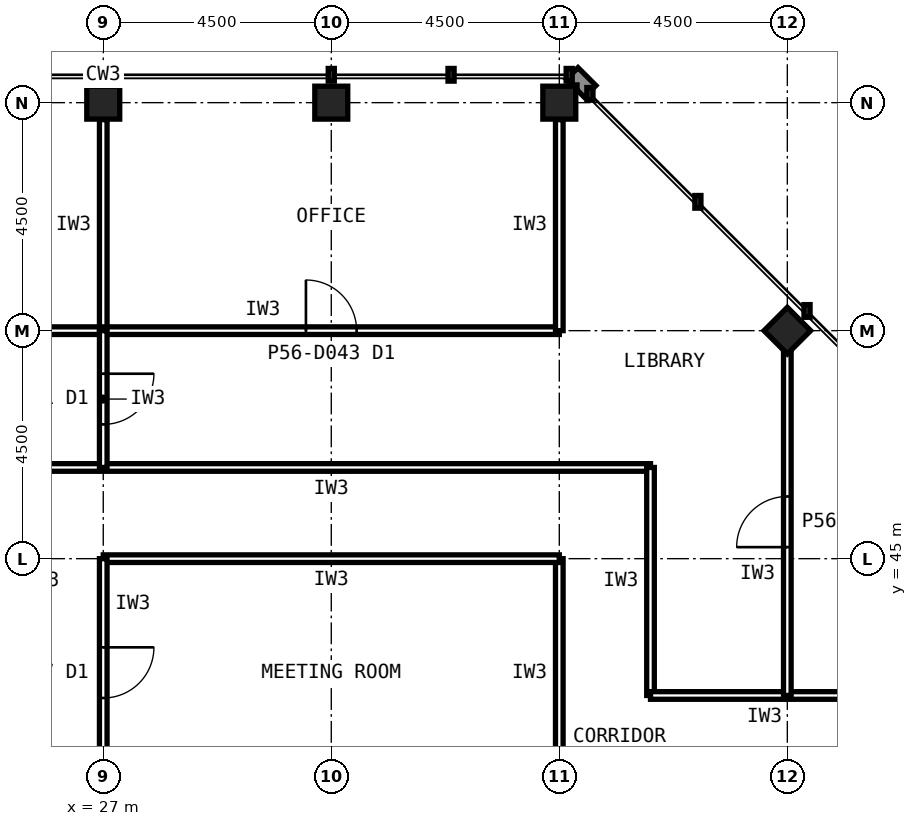
"""IFC4 building model, lengths in metres.
Left out: names, types, materials, properties, quantities, classifications, styles, units other than length and angle.
Written with IfcOpenShell. Run it as: python <this file> out.ifc"""

import sys

from ifc_helpers import new_model, si_unit, direction, frame, frame_2d, origin, origin_2d, place, context, subcontext, project, spatial, rectangle, hollow_rectangle, extrude, element, fill, save


model = new_model("IFC4")
c1 = context("Model", 3, precision=1e-05, world=origin(), true_north=direction((0.0, 1.0)))
c2 = subcontext(c1, "Body", "Model", "MODEL_VIEW")
j1 = project(units=[si_unit("LENGTHUNIT", "METRE"), si_unit("PLANEANGLEUNIT", "RADIAN")], contexts=[c1])
p1 = place(None, origin())
s1 = spatial("IfcSite", under=j1, at=p1, CompositionType="ELEMENT")
p2 = place(p1, origin())
s2 = spatial("IfcBuilding", under=s1, at=p2, CompositionType="ELEMENT")
p3 = place(p2, frame((0.0, 0.0, 238.6)))
s3 = spatial("IfcBuildingStorey", under=s2, at=p3, CompositionType="ELEMENT", Elevation=238.6)
for number, where, z_axis, x_axis in (
    (1, (36.0, 54.0, 0.0), (0.0, 0.0, 1.0), (1.0, 0.0, 0.0)),
    (2, (31.5, 54.0, 0.0), (0.0, 0.0, 1.0), (1.0, 0.0, 0.0)),
    (3, (27.0, 54.0, 0.0), (0.0, 0.0, 1.0), (1.0, 0.0, 0.0)),
    (4, (40.5, 49.5, 0.0), (0.0, 0.0, 1.0), (0.707, 0.707, 0.0)),
):
    element("IfcColumn", number, at=place(p3, frame(where, z_axis=z_axis, x_axis=x_axis)), inside=s3, PredefinedType="COLUMN", context=c2, shape_type="SweptSolid", body=[
        extrude(hollow_rectangle(XDim=0.65, YDim=0.65, WallThickness=0.032, at=origin_2d()), origin(), (0.0, 0.0, 1.0), 4.0),
    ])
p4 = place(p3, frame((37.8, 46.8, 0.0), z_axis=(0.0, 0.0, 1.0), x_axis=(-1.0, 0.0, 0.0)))
e5 = element("IfcWall", 5, at=p4, inside=s3, PredefinedType="PARTITIONING", context=c2, shape_type="SweptSolid", body=[
    extrude(rectangle(XDim=12.6, YDim=0.15, at=frame_2d((6.3, 0.0))), origin(), (0.0, 0.0, 1.0), 3.84),
])
for number, where, z_axis, x_axis in (
    (6, (37.8, 42.3, 0.0), (0.0, 0.0, 1.0), (0.0, 1.0, 0.0)),
    (7, (42.3, 42.3, 0.0), (0.0, 0.0, 1.0), (-1.0, 0.0, 0.0)),
):
    element("IfcWall", number, at=place(p3, frame(where, z_axis=z_axis, x_axis=x_axis)), inside=s3, PredefinedType="PARTITIONING", context=c2, shape_type="SweptSolid", body=[
        extrude(rectangle(XDim=4.5, YDim=0.15, at=frame_2d((2.25, 0.0))), origin(), (0.0, 0.0, 1.0), 3.84),
    ])
p5 = place(p3, frame((36.0, 40.5, 0.0), z_axis=(0.0, 0.0, 1.0), x_axis=(0.0, 1.0, 0.0)))
e8 = element("IfcWall", 8, at=p5, inside=s3, PredefinedType="PARTITIONING", context=c2, shape_type="SweptSolid", body=[
    extrude(rectangle(XDim=4.5, YDim=0.15, at=frame_2d((2.25, 0.0))), origin(), (0.0, 0.0, 1.0), 2.989),
])
p6 = place(p3, frame((36.0, 45.0, 0.0), z_axis=(0.0, 0.0, 1.0), x_axis=(-1.0, 0.0, 0.0)))
e9 = element("IfcWall", 9, at=p6, inside=s3, PredefinedType="PARTITIONING", context=c2, shape_type="SweptSolid", body=[
    extrude(rectangle(XDim=9.0, YDim=0.15, at=frame_2d((4.5, 0.0))), origin(), (0.0, 0.0, 1.0), 3.84),
])
p7 = place(p3, frame((27.0, 45.0, 0.0), z_axis=(0.0, 0.0, 1.0), x_axis=(0.0, -1.0, 0.0)))
e10 = element("IfcWall", 10, at=p7, inside=s3, PredefinedType="PARTITIONING", context=c2, shape_type="SweptSolid", body=[
    extrude(rectangle(XDim=4.5, YDim=0.15, at=frame_2d((2.25, 0.0))), origin(), (0.0, 0.0, 1.0), 2.989),
])
p8 = place(p7, frame((1.75, 0.0, 0.0)))
e11 = element("IfcOpeningElement", 11, at=p8, cuts=e10, PredefinedType="OPENING", context=c2, shape_type="SweptSolid", body=[
    extrude(rectangle(XDim=1.0, YDim=2.1, at=frame_2d((0.5, 1.05))), frame((0.0, 0.085, 0.0), z_axis=(0.0, -1.0, 0.0), x_axis=(1.0, 0.0, 0.0)), (0.0, 0.0, 1.0), 0.17),
])
p9 = place(p3, frame((18.0, 49.5, 0.0), z_axis=(0.0, 0.0, 1.0), x_axis=(1.0, 0.0, 0.0)))
e12 = element("IfcWall", 12, at=p9, inside=s3, PredefinedType="PARTITIONING", context=c2, shape_type="SweptSolid", body=[
    extrude(rectangle(XDim=9.0, YDim=0.15, at=frame_2d((4.5, 0.0))), origin(), (0.0, 0.0, 1.0), 3.84),
])
p10 = place(p9, frame((4.0, 0.0, 0.0)))
e13 = element("IfcOpeningElement", 13, at=p10, cuts=e12, PredefinedType="OPENING", context=c2, shape_type="SweptSolid", body=[
    extrude(rectangle(XDim=1.0, YDim=2.1, at=frame_2d((0.5, 1.05))), frame((0.0, 0.085, 0.0), z_axis=(0.0, -1.0, 0.0), x_axis=(1.0, 0.0, 0.0)), (0.0, 0.0, 1.0), 0.17),
])
p11 = place(p3, frame((27.0, 49.5, 0.0), z_axis=(0.0, 0.0, 1.0), x_axis=(0.0, 1.0, 0.0)))
e14 = element("IfcWall", 14, at=p11, inside=s3, PredefinedType="PARTITIONING", context=c2, shape_type="SweptSolid", body=[
    extrude(rectangle(XDim=4.165, YDim=0.15, at=frame_2d((2.083, 0.0))), origin(), (0.0, 0.0, 1.0), 2.989),
])
p12 = place(p3, frame((27.0, 49.5, 0.0), z_axis=(0.0, 0.0, 1.0), x_axis=(1.0, 0.0, 0.0)))
e15 = element("IfcWall", 15, at=p12, inside=s3, PredefinedType="PARTITIONING", context=c2, shape_type="SweptSolid", body=[
    extrude(rectangle(XDim=9.0, YDim=0.15, at=frame_2d((4.5, 0.0))), origin(), (0.0, 0.0, 1.0), 3.84),
])
p13 = place(p12, frame((4.0, 0.0, 0.0)))
e16 = element("IfcOpeningElement", 16, at=p13, cuts=e15, PredefinedType="OPENING", context=c2, shape_type="SweptSolid", body=[
    extrude(rectangle(XDim=1.0, YDim=2.1, at=frame_2d((0.5, 1.05))), frame((0.0, 0.085, 0.0), z_axis=(0.0, -1.0, 0.0), x_axis=(1.0, 0.0, 0.0)), (0.0, 0.0, 1.0), 0.17),
])
p14 = place(p3, frame((36.0, 49.5, 0.0), z_axis=(0.0, 0.0, 1.0), x_axis=(0.0, 1.0, 0.0)))
e17 = element("IfcWall", 17, at=p14, inside=s3, PredefinedType="PARTITIONING", context=c2, shape_type="SweptSolid", body=[
    extrude(rectangle(XDim=4.165, YDim=0.15, at=frame_2d((2.083, 0.0))), origin(), (0.0, 0.0, 1.0), 2.989),
])
p15 = place(p3, frame((27.0, 49.5, 0.0), z_axis=(0.0, 0.0, 1.0), x_axis=(0.0, -1.0, 0.0)))
e18 = element("IfcWall", 18, at=p15, inside=s3, PredefinedType="PARTITIONING", context=c2, shape_type="SweptSolid", body=[
    extrude(rectangle(XDim=2.7, YDim=0.15, at=frame_2d((1.35, 0.0))), origin(), (0.0, 0.0, 1.0), 2.989),
])
p16 = place(p15, frame((0.85, 0.0, 0.0)))
e19 = element("IfcOpeningElement", 19, at=p16, cuts=e18, PredefinedType="OPENING", context=c2, shape_type="SweptSolid", body=[
    extrude(rectangle(XDim=1.0, YDim=2.1, at=frame_2d((0.5, 1.05))), frame((0.0, 0.085, 0.0), z_axis=(0.0, -1.0, 0.0), x_axis=(1.0, 0.0, 0.0)), (0.0, 0.0, 1.0), 0.17),
])
p17 = place(p3, frame((40.5, 42.3, 0.0), z_axis=(0.0, 0.0, 1.0), x_axis=(0.0, 1.0, 0.0)))
e20 = element("IfcWall", 20, at=p17, inside=s3, PredefinedType="PARTITIONING", context=c2, shape_type="SweptSolid", body=[
    extrude(rectangle(XDim=6.855, YDim=0.15, at=frame_2d((3.427, 0.0))), origin(), (0.0, 0.0, 1.0), 2.989),
])
p18 = place(p17, frame((2.927, 0.0, 0.0)))
e21 = element("IfcOpeningElement", 21, at=p18, cuts=e20, PredefinedType="OPENING", context=c2, shape_type="SweptSolid", body=[
    extrude(rectangle(XDim=1.0, YDim=2.1, at=frame_2d((0.5, 1.05))), frame((0.0, 0.085, 0.0), z_axis=(0.0, -1.0, 0.0), x_axis=(1.0, 0.0, 0.0)), (0.0, 0.0, 1.0), 0.17),
])
p19 = place(p8, origin())
e22 = element("IfcDoor", 22, at=p19, inside=s3, OperationType="SINGLE_SWING_LEFT", PredefinedType="DOOR", context=c2, shape_type="SweptSolid", body=[
    extrude(rectangle(XDim=1.0, YDim=2.1, at=frame_2d((0.5, 1.05))), frame((0.0, 0.025, 0.0), z_axis=(0.0, -1.0, 0.0), x_axis=(1.0, 0.0, 0.0)), (0.0, 0.0, 1.0), 0.05),
])
fill(e11, e22)
p20 = place(p13, origin())
e23 = element("IfcDoor", 23, at=p20, inside=s3, OperationType="SINGLE_SWING_LEFT", PredefinedType="DOOR", context=c2, shape_type="SweptSolid", body=[
    extrude(rectangle(XDim=1.0, YDim=2.1, at=frame_2d((0.5, 1.05))), frame((0.0, 0.025, 0.0), z_axis=(0.0, -1.0, 0.0), x_axis=(1.0, 0.0, 0.0)), (0.0, 0.0, 1.0), 0.05),
])
fill(e16, e23)
p21 = place(p16, origin())
e24 = element("IfcDoor", 24, at=p21, inside=s3, OperationType="SINGLE_SWING_LEFT", PredefinedType="DOOR", context=c2, shape_type="SweptSolid", body=[
    extrude(rectangle(XDim=1.0, YDim=2.1, at=frame_2d((0.5, 1.05))), frame((0.0, 0.025, 0.0), z_axis=(0.0, -1.0, 0.0), x_axis=(1.0, 0.0, 0.0)), (0.0, 0.0, 1.0), 0.05),
])
fill(e19, e24)
p22 = place(p18, origin())
e25 = element("IfcDoor", 25, at=p22, inside=s3, OperationType="SINGLE_SWING_LEFT", PredefinedType="DOOR", context=c2, shape_type="SweptSolid", body=[
    extrude(rectangle(XDim=1.0, YDim=2.1, at=frame_2d((0.5, 1.05))), frame((0.0, 0.025, 0.0), z_axis=(0.0, -1.0, 0.0), x_axis=(1.0, 0.0, 0.0)), (0.0, 0.0, 1.0), 0.05),
])
fill(e21, e25)
save(model, sys.argv[1])
